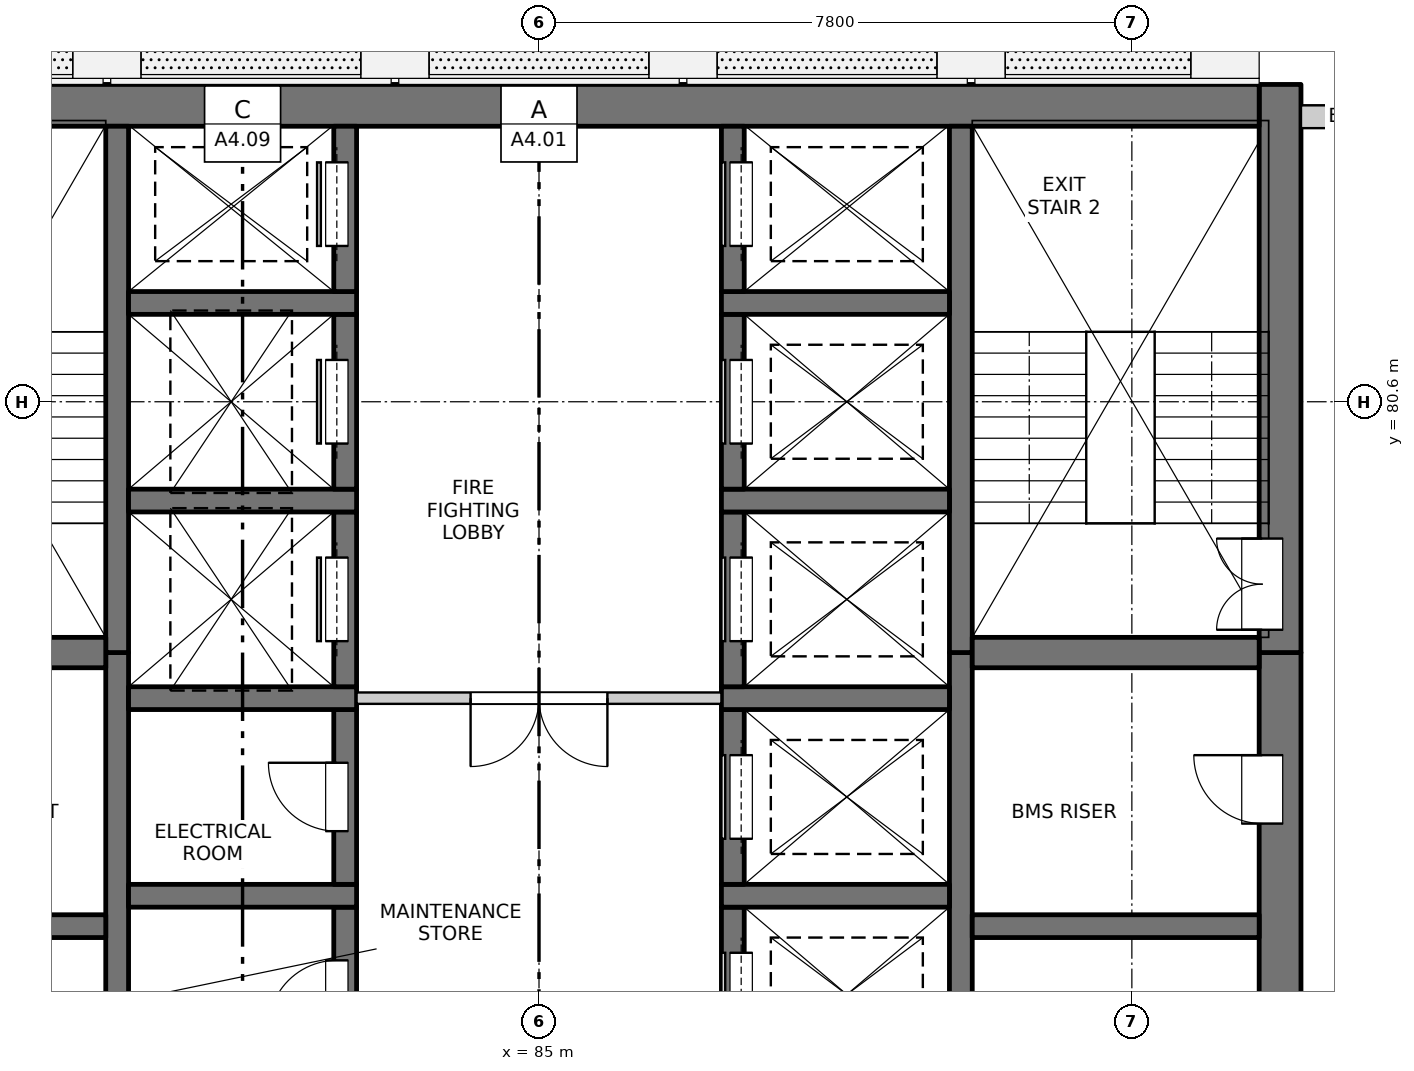
"""IFC4 building model, lengths in metres.
Left out: names, types, materials, properties, quantities, classifications, styles, units other than length and angle.
Written with IfcOpenShell. Run it as: python <this file> out.ifc"""

import sys

from ifc_helpers import new_model, si_unit, direction, frame, frame_2d, origin, place, context, subcontext, project, spatial, rectangle, extrude, element, fill, save


model = new_model("IFC4")
c1 = context("Model", 3, precision=1e-05, world=origin(), true_north=direction((0.0, 1.0)))
c2 = subcontext(c1, "Body", "Model", "MODEL_VIEW")
j1 = project(units=[si_unit("LENGTHUNIT", "METRE"), si_unit("PLANEANGLEUNIT", "RADIAN")], contexts=[c1])
p1 = place(None, origin())
s1 = spatial("IfcSite", under=j1, at=p1, CompositionType="ELEMENT")
p2 = place(p1, origin())
s2 = spatial("IfcBuilding", under=s1, at=p2, CompositionType="ELEMENT")
p3 = place(p2, frame((0.0, 0.0, 186.0)))
s3 = spatial("IfcBuildingStorey", under=s2, at=p3, CompositionType="ELEMENT", Elevation=186.0)
p4 = place(p3, frame((94.75, 61.95, -0.25), z_axis=(0.0, 0.0, 1.0), x_axis=(0.0, 1.0, 0.0)))
e1 = element("IfcWall", 1, at=p4, inside=s3, PredefinedType="SOLIDWALL", context=c2, shape_type="SweptSolid", body=[
    extrude(rectangle(XDim=15.35, YDim=0.55, at=frame_2d((7.675, 0.0))), origin(), (0.0, 0.0, 1.0), 3.4),
])
p5 = place(p4, frame((0.925, 0.0, 0.25)))
e2 = element("IfcOpeningElement", 2, at=p5, cuts=e1, PredefinedType="OPENING", context=c2, shape_type="SweptSolid", body=[
    extrude(rectangle(XDim=0.9, YDim=2.1, at=frame_2d((0.45, 1.05))), frame((0.0, 0.285, 0.0), z_axis=(0.0, -1.0, 0.0), x_axis=(1.0, 0.0, 0.0)), (0.0, 0.0, 1.0), 0.57),
])
p6 = place(p4, frame((6.8, 0.0, 0.25)))
e3 = element("IfcOpeningElement", 3, at=p6, cuts=e1, PredefinedType="OPENING", context=c2, shape_type="SweptSolid", body=[
    extrude(rectangle(XDim=0.9, YDim=2.1, at=frame_2d((0.45, 1.05))), frame((0.0, 0.285, 0.0), z_axis=(0.0, -1.0, 0.0), x_axis=(1.0, 0.0, 0.0)), (0.0, 0.0, 1.0), 0.57),
])
p7 = place(p4, frame((13.1, 0.0, 0.25)))
e4 = element("IfcOpeningElement", 4, at=p7, cuts=e1, PredefinedType="OPENING", context=c2, shape_type="SweptSolid", body=[
    extrude(rectangle(XDim=0.9, YDim=2.1, at=frame_2d((0.45, 1.05))), frame((0.0, 0.285, 0.0), z_axis=(0.0, -1.0, 0.0), x_axis=(1.0, 0.0, 0.0)), (0.0, 0.0, 1.0), 0.57),
])
p8 = place(p3, frame((94.75, 77.3, -0.25), z_axis=(0.0, 0.0, 1.0), x_axis=(0.0, 1.0, 0.0)))
e5 = element("IfcWall", 5, at=p8, inside=s3, PredefinedType="SOLIDWALL", context=c2, shape_type="SweptSolid", body=[
    extrude(rectangle(XDim=7.475, YDim=0.55, at=frame_2d((3.737, 0.0))), origin(), (0.0, 0.0, 1.0), 3.4),
])
p9 = place(p8, frame((0.3, 0.0, 0.25)))
e6 = element("IfcOpeningElement", 6, at=p9, cuts=e5, PredefinedType="OPENING", context=c2, shape_type="SweptSolid", body=[
    extrude(rectangle(XDim=1.2, YDim=2.1, at=frame_2d((0.6, 1.05))), frame((0.0, 0.285, 0.0), z_axis=(0.0, -1.0, 0.0), x_axis=(1.0, 0.0, 0.0)), (0.0, 0.0, 1.0), 0.57),
])
p10 = place(p3, frame((75.525, 84.5, -0.25), z_axis=(0.0, 0.0, 1.0), x_axis=(1.0, 0.0, 0.0)))
e7 = element("IfcWall", 7, at=p10, inside=s3, PredefinedType="SOLIDWALL", context=c2, shape_type="SweptSolid", body=[
    extrude(rectangle(XDim=18.95, YDim=0.55, at=frame_2d((9.475, 0.0))), origin(), (0.0, 0.0, 1.0), 3.4),
])
p11 = place(p3, frame((79.45, 60.95, -0.25), z_axis=(0.0, 0.0, 1.0), x_axis=(0.0, 1.0, 0.0)))
e8 = element("IfcWall", 8, at=p11, inside=s3, PredefinedType="SOLIDWALL", context=c2, shape_type="SweptSolid", body=[
    extrude(rectangle(XDim=16.35, YDim=0.3, at=frame_2d((8.175, 0.0))), origin(), (0.0, 0.0, 1.0), 3.4),
])
p12 = place(p3, frame((79.45, 77.3, -0.25), z_axis=(0.0, 0.0, 1.0), x_axis=(0.0, 1.0, 0.0)))
e9 = element("IfcWall", 9, at=p12, inside=s3, PredefinedType="SOLIDWALL", context=c2, shape_type="SweptSolid", body=[
    extrude(rectangle(XDim=6.925, YDim=0.3, at=frame_2d((3.462, 0.0))), origin(), (0.0, 0.0, 1.0), 3.4),
])
p13 = place(p3, frame((90.55, 61.95, -0.25), z_axis=(0.0, 0.0, 1.0), x_axis=(0.0, 1.0, 0.0)))
e10 = element("IfcWall", 10, at=p13, inside=s3, PredefinedType="SOLIDWALL", context=c2, shape_type="SweptSolid", body=[
    extrude(rectangle(XDim=15.35, YDim=0.3, at=frame_2d((7.675, 0.0))), origin(), (0.0, 0.0, 1.0), 3.4),
])
p14 = place(p3, frame((90.55, 77.3, -0.25), z_axis=(0.0, 0.0, 1.0), x_axis=(0.0, 1.0, 0.0)))
e11 = element("IfcWall", 11, at=p14, inside=s3, PredefinedType="SOLIDWALL", context=c2, shape_type="SweptSolid", body=[
    extrude(rectangle(XDim=6.925, YDim=0.3, at=frame_2d((3.462, 0.0))), origin(), (0.0, 0.0, 1.0), 3.4),
])
p15 = place(p3, frame((82.45, 71.65, -0.25), z_axis=(0.0, 0.0, 1.0), x_axis=(0.0, 1.0, 0.0)))
e12 = element("IfcWall", 12, at=p15, inside=s3, PredefinedType="SOLIDWALL", context=c2, shape_type="SweptSolid", body=[
    extrude(rectangle(XDim=2.3, YDim=0.3, at=frame_2d((1.15, 0.0))), origin(), (0.0, 0.0, 1.0), 3.4),
])
p16 = place(p15, frame((0.7, 0.0, 0.25)))
e13 = element("IfcOpeningElement", 13, at=p16, cuts=e12, PredefinedType="OPENING", context=c2, shape_type="SweptSolid", body=[
    extrude(rectangle(XDim=0.9, YDim=2.1, at=frame_2d((0.45, 1.05))), frame((0.0, 0.16, 0.0), z_axis=(0.0, -1.0, 0.0), x_axis=(1.0, 0.0, 0.0)), (0.0, 0.0, 1.0), 0.32),
])
p17 = place(p3, frame((79.6, 74.1, -0.25), z_axis=(0.0, 0.0, 1.0), x_axis=(1.0, 0.0, 0.0)))
e14 = element("IfcWall", 14, at=p17, inside=s3, PredefinedType="SOLIDWALL", context=c2, shape_type="SweptSolid", body=[
    extrude(rectangle(XDim=3.0, YDim=0.3, at=frame_2d((1.5, 0.0))), origin(), (0.0, 0.0, 1.0), 3.4),
])
p18 = place(p3, frame((82.45, 74.25, -0.25), z_axis=(0.0, 0.0, 1.0), x_axis=(0.0, 1.0, 0.0)))
e15 = element("IfcWall", 15, at=p18, inside=s3, PredefinedType="SOLIDWALL", context=c2, shape_type="SweptSolid", body=[
    extrude(rectangle(XDim=2.3, YDim=0.3, at=frame_2d((1.15, 0.0))), origin(), (0.0, 0.0, 1.0), 3.4),
])
p19 = place(p18, frame((0.7, 0.0, 0.25)))
e16 = element("IfcOpeningElement", 16, at=p19, cuts=e15, PredefinedType="OPENING", context=c2, shape_type="SweptSolid", body=[
    extrude(rectangle(XDim=0.9, YDim=2.1, at=frame_2d((0.45, 1.05))), frame((0.0, 0.16, 0.0), z_axis=(0.0, -1.0, 0.0), x_axis=(1.0, 0.0, 0.0)), (0.0, 0.0, 1.0), 0.32),
])
p20 = place(p3, frame((79.6, 76.7, -0.25), z_axis=(0.0, 0.0, 1.0), x_axis=(1.0, 0.0, 0.0)))
e17 = element("IfcWall", 17, at=p20, inside=s3, PredefinedType="SOLIDWALL", context=c2, shape_type="SweptSolid", body=[
    extrude(rectangle(XDim=3.0, YDim=0.3, at=frame_2d((1.5, 0.0))), origin(), (0.0, 0.0, 1.0), 3.4),
])
p21 = place(p3, frame((82.45, 76.85, -0.25), z_axis=(0.0, 0.0, 1.0), x_axis=(0.0, 1.0, 0.0)))
e18 = element("IfcWall", 18, at=p21, inside=s3, PredefinedType="SOLIDWALL", context=c2, shape_type="SweptSolid", body=[
    extrude(rectangle(XDim=2.3, YDim=0.3, at=frame_2d((1.15, 0.0))), origin(), (0.0, 0.0, 1.0), 3.4),
])
p22 = place(p21, frame((0.6, 0.0, 0.25)))
e19 = element("IfcOpeningElement", 19, at=p22, cuts=e18, PredefinedType="OPENING", context=c2, shape_type="SweptSolid", body=[
    extrude(rectangle(XDim=1.1, YDim=2.1, at=frame_2d((0.55, 1.05))), frame((0.0, 0.16, 0.0), z_axis=(0.0, -1.0, 0.0), x_axis=(1.0, 0.0, 0.0)), (0.0, 0.0, 1.0), 0.32),
])
p23 = place(p3, frame((79.6, 79.3, -0.25), z_axis=(0.0, 0.0, 1.0), x_axis=(1.0, 0.0, 0.0)))
e20 = element("IfcWall", 20, at=p23, inside=s3, PredefinedType="SOLIDWALL", context=c2, shape_type="SweptSolid", body=[
    extrude(rectangle(XDim=3.0, YDim=0.3, at=frame_2d((1.5, 0.0))), origin(), (0.0, 0.0, 1.0), 3.4),
])
p24 = place(p3, frame((82.45, 79.45, -0.25), z_axis=(0.0, 0.0, 1.0), x_axis=(0.0, 1.0, 0.0)))
e21 = element("IfcWall", 21, at=p24, inside=s3, PredefinedType="SOLIDWALL", context=c2, shape_type="SweptSolid", body=[
    extrude(rectangle(XDim=2.3, YDim=0.3, at=frame_2d((1.15, 0.0))), origin(), (0.0, 0.0, 1.0), 3.4),
])
p25 = place(p24, frame((0.6, 0.0, 0.25)))
e22 = element("IfcOpeningElement", 22, at=p25, cuts=e21, PredefinedType="OPENING", context=c2, shape_type="SweptSolid", body=[
    extrude(rectangle(XDim=1.1, YDim=2.1, at=frame_2d((0.55, 1.05))), frame((0.0, 0.16, 0.0), z_axis=(0.0, -1.0, 0.0), x_axis=(1.0, 0.0, 0.0)), (0.0, 0.0, 1.0), 0.32),
])
p26 = place(p3, frame((79.6, 81.9, -0.25), z_axis=(0.0, 0.0, 1.0), x_axis=(1.0, 0.0, 0.0)))
e23 = element("IfcWall", 23, at=p26, inside=s3, PredefinedType="SOLIDWALL", context=c2, shape_type="SweptSolid", body=[
    extrude(rectangle(XDim=3.0, YDim=0.3, at=frame_2d((1.5, 0.0))), origin(), (0.0, 0.0, 1.0), 3.4),
])
p27 = place(p3, frame((82.45, 82.05, -0.25), z_axis=(0.0, 0.0, 1.0), x_axis=(0.0, 1.0, 0.0)))
e24 = element("IfcWall", 24, at=p27, inside=s3, PredefinedType="SOLIDWALL", context=c2, shape_type="SweptSolid", body=[
    extrude(rectangle(XDim=2.175, YDim=0.3, at=frame_2d((1.087, 0.0))), origin(), (0.0, 0.0, 1.0), 3.4),
])
p28 = place(p27, frame((0.6, 0.0, 0.25)))
e25 = element("IfcOpeningElement", 25, at=p28, cuts=e24, PredefinedType="OPENING", context=c2, shape_type="SweptSolid", body=[
    extrude(rectangle(XDim=1.1, YDim=2.1, at=frame_2d((0.55, 1.05))), frame((0.0, 0.16, 0.0), z_axis=(0.0, -1.0, 0.0), x_axis=(1.0, 0.0, 0.0)), (0.0, 0.0, 1.0), 0.32),
])
p29 = place(p3, frame((87.55, 71.65, -0.25), z_axis=(0.0, 0.0, 1.0), x_axis=(0.0, 1.0, 0.0)))
e26 = element("IfcWall", 26, at=p29, inside=s3, PredefinedType="SOLIDWALL", context=c2, shape_type="SweptSolid", body=[
    extrude(rectangle(XDim=2.3, YDim=0.3, at=frame_2d((1.15, 0.0))), origin(), (0.0, 0.0, 1.0), 3.4),
])
p30 = place(p29, frame((0.6, 0.0, 0.25)))
e27 = element("IfcOpeningElement", 27, at=p30, cuts=e26, PredefinedType="OPENING", context=c2, shape_type="SweptSolid", body=[
    extrude(rectangle(XDim=1.1, YDim=2.1, at=frame_2d((0.55, 1.05))), frame((0.0, 0.16, 0.0), z_axis=(0.0, -1.0, 0.0), x_axis=(1.0, 0.0, 0.0)), (0.0, 0.0, 1.0), 0.32),
])
p31 = place(p3, frame((87.4, 74.1, -0.25), z_axis=(0.0, 0.0, 1.0), x_axis=(1.0, 0.0, 0.0)))
e28 = element("IfcWall", 28, at=p31, inside=s3, PredefinedType="SOLIDWALL", context=c2, shape_type="SweptSolid", body=[
    extrude(rectangle(XDim=3.0, YDim=0.3, at=frame_2d((1.5, 0.0))), origin(), (0.0, 0.0, 1.0), 3.4),
])
p32 = place(p3, frame((87.55, 74.25, -0.25), z_axis=(0.0, 0.0, 1.0), x_axis=(0.0, 1.0, 0.0)))
e29 = element("IfcWall", 29, at=p32, inside=s3, PredefinedType="SOLIDWALL", context=c2, shape_type="SweptSolid", body=[
    extrude(rectangle(XDim=2.3, YDim=0.3, at=frame_2d((1.15, 0.0))), origin(), (0.0, 0.0, 1.0), 3.4),
])
p33 = place(p32, frame((0.6, 0.0, 0.25)))
e30 = element("IfcOpeningElement", 30, at=p33, cuts=e29, PredefinedType="OPENING", context=c2, shape_type="SweptSolid", body=[
    extrude(rectangle(XDim=1.1, YDim=2.1, at=frame_2d((0.55, 1.05))), frame((0.0, 0.16, 0.0), z_axis=(0.0, -1.0, 0.0), x_axis=(1.0, 0.0, 0.0)), (0.0, 0.0, 1.0), 0.32),
])
p34 = place(p3, frame((87.4, 76.7, -0.25), z_axis=(0.0, 0.0, 1.0), x_axis=(1.0, 0.0, 0.0)))
e31 = element("IfcWall", 31, at=p34, inside=s3, PredefinedType="SOLIDWALL", context=c2, shape_type="SweptSolid", body=[
    extrude(rectangle(XDim=3.0, YDim=0.3, at=frame_2d((1.5, 0.0))), origin(), (0.0, 0.0, 1.0), 3.4),
])
p35 = place(p3, frame((87.55, 76.85, -0.25), z_axis=(0.0, 0.0, 1.0), x_axis=(0.0, 1.0, 0.0)))
e32 = element("IfcWall", 32, at=p35, inside=s3, PredefinedType="SOLIDWALL", context=c2, shape_type="SweptSolid", body=[
    extrude(rectangle(XDim=2.3, YDim=0.3, at=frame_2d((1.15, 0.0))), origin(), (0.0, 0.0, 1.0), 3.4),
])
p36 = place(p35, frame((0.6, 0.0, 0.25)))
e33 = element("IfcOpeningElement", 33, at=p36, cuts=e32, PredefinedType="OPENING", context=c2, shape_type="SweptSolid", body=[
    extrude(rectangle(XDim=1.1, YDim=2.1, at=frame_2d((0.55, 1.05))), frame((0.0, 0.16, 0.0), z_axis=(0.0, -1.0, 0.0), x_axis=(1.0, 0.0, 0.0)), (0.0, 0.0, 1.0), 0.32),
])
p37 = place(p3, frame((87.4, 79.3, -0.25), z_axis=(0.0, 0.0, 1.0), x_axis=(1.0, 0.0, 0.0)))
e34 = element("IfcWall", 34, at=p37, inside=s3, PredefinedType="SOLIDWALL", context=c2, shape_type="SweptSolid", body=[
    extrude(rectangle(XDim=3.0, YDim=0.3, at=frame_2d((1.5, 0.0))), origin(), (0.0, 0.0, 1.0), 3.4),
])
p38 = place(p3, frame((87.55, 79.45, -0.25), z_axis=(0.0, 0.0, 1.0), x_axis=(0.0, 1.0, 0.0)))
e35 = element("IfcWall", 35, at=p38, inside=s3, PredefinedType="SOLIDWALL", context=c2, shape_type="SweptSolid", body=[
    extrude(rectangle(XDim=2.3, YDim=0.3, at=frame_2d((1.15, 0.0))), origin(), (0.0, 0.0, 1.0), 3.4),
])
p39 = place(p38, frame((0.6, 0.0, 0.25)))
e36 = element("IfcOpeningElement", 36, at=p39, cuts=e35, PredefinedType="OPENING", context=c2, shape_type="SweptSolid", body=[
    extrude(rectangle(XDim=1.1, YDim=2.1, at=frame_2d((0.55, 1.05))), frame((0.0, 0.16, 0.0), z_axis=(0.0, -1.0, 0.0), x_axis=(1.0, 0.0, 0.0)), (0.0, 0.0, 1.0), 0.32),
])
p40 = place(p3, frame((87.4, 81.9, -0.25), z_axis=(0.0, 0.0, 1.0), x_axis=(1.0, 0.0, 0.0)))
e37 = element("IfcWall", 37, at=p40, inside=s3, PredefinedType="SOLIDWALL", context=c2, shape_type="SweptSolid", body=[
    extrude(rectangle(XDim=3.0, YDim=0.3, at=frame_2d((1.5, 0.0))), origin(), (0.0, 0.0, 1.0), 3.4),
])
p41 = place(p3, frame((87.55, 82.05, -0.25), z_axis=(0.0, 0.0, 1.0), x_axis=(0.0, 1.0, 0.0)))
e38 = element("IfcWall", 38, at=p41, inside=s3, PredefinedType="SOLIDWALL", context=c2, shape_type="SweptSolid", body=[
    extrude(rectangle(XDim=2.175, YDim=0.3, at=frame_2d((1.087, 0.0))), origin(), (0.0, 0.0, 1.0), 3.4),
])
p42 = place(p41, frame((0.6, 0.0, 0.25)))
e39 = element("IfcOpeningElement", 39, at=p42, cuts=e38, PredefinedType="OPENING", context=c2, shape_type="SweptSolid", body=[
    extrude(rectangle(XDim=1.1, YDim=2.1, at=frame_2d((0.55, 1.05))), frame((0.0, 0.16, 0.0), z_axis=(0.0, -1.0, 0.0), x_axis=(1.0, 0.0, 0.0)), (0.0, 0.0, 1.0), 0.32),
])
p43 = place(p3, frame((75.525, 73.7, -0.25), z_axis=(0.0, 0.0, 1.0), x_axis=(1.0, 0.0, 0.0)))
e40 = element("IfcWall", 40, at=p43, inside=s3, PredefinedType="SOLIDWALL", context=c2, shape_type="SweptSolid", body=[
    extrude(rectangle(XDim=3.775, YDim=0.3, at=frame_2d((1.888, 0.0))), origin(), (0.0, 0.0, 1.0), 3.4),
])
p44 = place(p3, frame((75.525, 77.3, -0.25), z_axis=(0.0, 0.0, 1.0), x_axis=(1.0, 0.0, 0.0)))
e41 = element("IfcWall", 41, at=p44, inside=s3, PredefinedType="SOLIDWALL", context=c2, shape_type="SweptSolid", body=[
    extrude(rectangle(XDim=3.775, YDim=0.4, at=frame_2d((1.888, 0.0))), origin(), (0.0, 0.0, 1.0), 3.4),
])
p45 = place(p3, frame((90.7, 73.7, -0.25), z_axis=(0.0, 0.0, 1.0), x_axis=(1.0, 0.0, 0.0)))
e42 = element("IfcWall", 42, at=p45, inside=s3, PredefinedType="SOLIDWALL", context=c2, shape_type="SweptSolid", body=[
    extrude(rectangle(XDim=3.775, YDim=0.3, at=frame_2d((1.888, 0.0))), origin(), (0.0, 0.0, 1.0), 3.4),
])
p46 = place(p3, frame((90.7, 77.3, -0.25), z_axis=(0.0, 0.0, 1.0), x_axis=(1.0, 0.0, 0.0)))
e43 = element("IfcWall", 43, at=p46, inside=s3, PredefinedType="SOLIDWALL", context=c2, shape_type="SweptSolid", body=[
    extrude(rectangle(XDim=3.775, YDim=0.4, at=frame_2d((1.888, 0.0))), origin(), (0.0, 0.0, 1.0), 3.4),
])
p47 = place(p3, frame((95.025, 84.35, 0.0), z_axis=(0.0, 0.0, 1.0), x_axis=(1.0, 0.0, 0.0)))
e44 = element("IfcWall", 44, at=p47, inside=s3, PredefinedType="SOLIDWALL", context=c2, shape_type="SweptSolid", body=[
    extrude(rectangle(XDim=1.3, YDim=0.3, at=frame_2d((0.65, 0.0))), origin(), (0.0, 0.0, 1.0), 2.7),
])
p48 = place(p3, frame((82.6, 76.7, 0.0), z_axis=(0.0, 0.0, 1.0), x_axis=(1.0, 0.0, 0.0)))
e45 = element("IfcWall", 45, at=p48, inside=s3, PredefinedType="PARTITIONING", context=c2, shape_type="SweptSolid", body=[
    extrude(rectangle(XDim=4.8, YDim=0.15, at=frame_2d((2.4, 0.0))), origin(), (0.0, 0.0, 1.0), 3.15),
])
p49 = place(p48, frame((1.5, 0.0, 0.0)))
e46 = element("IfcOpeningElement", 46, at=p49, cuts=e45, PredefinedType="OPENING", context=c2, shape_type="SweptSolid", body=[
    extrude(rectangle(XDim=1.8, YDim=2.1, at=frame_2d((0.9, 1.05))), frame((0.0, 0.085, 0.0), z_axis=(0.0, -1.0, 0.0), x_axis=(1.0, 0.0, 0.0)), (0.0, 0.0, 1.0), 0.17),
])
p50 = place(p16, origin())
e47 = element("IfcDoor", 47, at=p50, inside=s3, OperationType="SINGLE_SWING_LEFT", PredefinedType="DOOR", context=c2, shape_type="SweptSolid", body=[
    extrude(rectangle(XDim=0.9, YDim=2.1, at=frame_2d((0.45, 1.05))), frame((0.0, 0.135, 0.0), z_axis=(0.0, -1.0, 0.0), x_axis=(1.0, 0.0, 0.0)), (0.0, 0.0, 1.0), 0.05),
])
fill(e13, e47)
p51 = place(p30, origin())
e48 = element("IfcDoor", 48, at=p51, inside=s3, OperationType="SLIDING_TO_LEFT", PredefinedType="DOOR", context=c2, shape_type="SweptSolid", body=[
    extrude(rectangle(XDim=1.1, YDim=2.1, at=frame_2d((0.55, 1.05))), frame((0.0, -0.085, 0.0), z_axis=(0.0, -1.0, 0.0), x_axis=(1.0, 0.0, 0.0)), (0.0, 0.0, 1.0), 0.05),
])
fill(e27, e48)
p52 = place(p19, origin())
e49 = element("IfcDoor", 49, at=p52, inside=s3, OperationType="SINGLE_SWING_RIGHT", PredefinedType="DOOR", context=c2, shape_type="SweptSolid", body=[
    extrude(rectangle(XDim=0.9, YDim=2.1, at=frame_2d((0.45, 1.05))), frame((0.0, 0.135, 0.0), z_axis=(0.0, -1.0, 0.0), x_axis=(1.0, 0.0, 0.0)), (0.0, 0.0, 1.0), 0.05),
])
fill(e16, e49)
p53 = place(p33, origin())
e50 = element("IfcDoor", 50, at=p53, inside=s3, OperationType="SLIDING_TO_LEFT", PredefinedType="DOOR", context=c2, shape_type="SweptSolid", body=[
    extrude(rectangle(XDim=1.1, YDim=2.1, at=frame_2d((0.55, 1.05))), frame((0.0, -0.085, 0.0), z_axis=(0.0, -1.0, 0.0), x_axis=(1.0, 0.0, 0.0)), (0.0, 0.0, 1.0), 0.05),
])
fill(e30, e50)
p54 = place(p7, origin())
e51 = element("IfcDoor", 51, at=p54, inside=s3, OperationType="SINGLE_SWING_RIGHT", PredefinedType="DOOR", context=c2, shape_type="SweptSolid", body=[
    extrude(rectangle(XDim=0.9, YDim=2.1, at=frame_2d((0.45, 1.05))), frame((0.0, 0.26, 0.0), z_axis=(0.0, -1.0, 0.0), x_axis=(1.0, 0.0, 0.0)), (0.0, 0.0, 1.0), 0.05),
])
fill(e4, e51)
p55 = place(p49, origin())
e52 = element("IfcDoor", 52, at=p55, inside=s3, OperationType="DOUBLE_DOOR_SINGLE_SWING", PredefinedType="DOOR", context=c2, shape_type="SweptSolid", body=[
    extrude(rectangle(XDim=1.8, YDim=2.1, at=frame_2d((0.9, 1.05))), frame((0.0, 0.025, 0.0), z_axis=(0.0, -1.0, 0.0), x_axis=(1.0, 0.0, 0.0)), (0.0, 0.0, 1.0), 0.05),
])
fill(e46, e52)
p56 = place(p22, origin())
e53 = element("IfcDoor", 53, at=p56, inside=s3, OperationType="SLIDING_TO_LEFT", PredefinedType="DOOR", context=c2, shape_type="SweptSolid", body=[
    extrude(rectangle(XDim=1.1, YDim=2.1, at=frame_2d((0.55, 1.05))), frame((0.0, 0.135, 0.0), z_axis=(0.0, -1.0, 0.0), x_axis=(1.0, 0.0, 0.0)), (0.0, 0.0, 1.0), 0.05),
])
fill(e19, e53)
p57 = place(p36, origin())
e54 = element("IfcDoor", 54, at=p57, inside=s3, OperationType="SLIDING_TO_LEFT", PredefinedType="DOOR", context=c2, shape_type="SweptSolid", body=[
    extrude(rectangle(XDim=1.1, YDim=2.1, at=frame_2d((0.55, 1.05))), frame((0.0, -0.085, 0.0), z_axis=(0.0, -1.0, 0.0), x_axis=(1.0, 0.0, 0.0)), (0.0, 0.0, 1.0), 0.05),
])
fill(e33, e54)
p58 = place(p9, origin())
e55 = element("IfcDoor", 55, at=p58, inside=s3, OperationType="DOUBLE_DOOR_SINGLE_SWING", PredefinedType="DOOR", context=c2, shape_type="SweptSolid", body=[
    extrude(rectangle(XDim=1.2, YDim=2.1, at=frame_2d((0.6, 1.05))), frame((0.0, 0.26, 0.0), z_axis=(0.0, -1.0, 0.0), x_axis=(1.0, 0.0, 0.0)), (0.0, 0.0, 1.0), 0.05),
])
fill(e6, e55)
p59 = place(p25, origin())
e56 = element("IfcDoor", 56, at=p59, inside=s3, OperationType="SLIDING_TO_LEFT", PredefinedType="DOOR", context=c2, shape_type="SweptSolid", body=[
    extrude(rectangle(XDim=1.1, YDim=2.1, at=frame_2d((0.55, 1.05))), frame((0.0, 0.135, 0.0), z_axis=(0.0, -1.0, 0.0), x_axis=(1.0, 0.0, 0.0)), (0.0, 0.0, 1.0), 0.05),
])
fill(e22, e56)
p60 = place(p39, origin())
e57 = element("IfcDoor", 57, at=p60, inside=s3, OperationType="SLIDING_TO_RIGHT", PredefinedType="DOOR", context=c2, shape_type="SweptSolid", body=[
    extrude(rectangle(XDim=1.1, YDim=2.1, at=frame_2d((0.55, 1.05))), frame((0.0, -0.085, 0.0), z_axis=(0.0, -1.0, 0.0), x_axis=(1.0, 0.0, 0.0)), (0.0, 0.0, 1.0), 0.05),
])
fill(e36, e57)
p61 = place(p28, origin())
e58 = element("IfcDoor", 58, at=p61, inside=s3, OperationType="SLIDING_TO_RIGHT", PredefinedType="DOOR", context=c2, shape_type="SweptSolid", body=[
    extrude(rectangle(XDim=1.1, YDim=2.1, at=frame_2d((0.55, 1.05))), frame((0.0, 0.135, 0.0), z_axis=(0.0, -1.0, 0.0), x_axis=(1.0, 0.0, 0.0)), (0.0, 0.0, 1.0), 0.05),
])
fill(e25, e58)
p62 = place(p42, origin())
e59 = element("IfcDoor", 59, at=p62, inside=s3, OperationType="SLIDING_TO_RIGHT", PredefinedType="DOOR", context=c2, shape_type="SweptSolid", body=[
    extrude(rectangle(XDim=1.1, YDim=2.1, at=frame_2d((0.55, 1.05))), frame((0.0, -0.085, 0.0), z_axis=(0.0, -1.0, 0.0), x_axis=(1.0, 0.0, 0.0)), (0.0, 0.0, 1.0), 0.05),
])
fill(e39, e59)
save(model, sys.argv[1])
